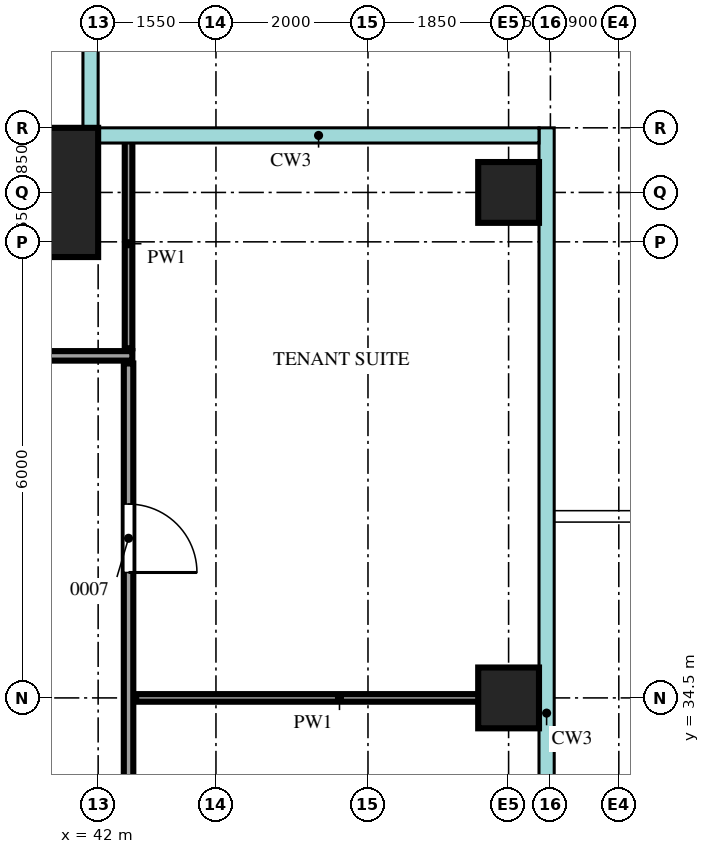
"""IFC4 building model, lengths in metres.
Left out: names, types, materials, properties, quantities, classifications, styles, units other than length and angle.
Written with IfcOpenShell. Run it as: python <this file> out.ifc"""

import sys

from ifc_helpers import new_model, si_unit, direction, frame, frame_2d, origin, origin_2d, place, context, subcontext, project, spatial, rectangle, extrude, source, transform, mapped, element, fill, save


model = new_model("IFC4")
c1 = context("Model", 3, precision=1e-05, world=origin(), true_north=direction((0.0, 1.0)))
c2 = subcontext(c1, "Body", "Model", "MODEL_VIEW")
j1 = project(units=[si_unit("LENGTHUNIT", "METRE"), si_unit("PLANEANGLEUNIT", "RADIAN")], contexts=[c1])
p1 = place(None, origin())
s1 = spatial("IfcSite", under=j1, at=p1, CompositionType="ELEMENT")
p2 = place(p1, origin())
s2 = spatial("IfcBuilding", under=s1, at=p2, CompositionType="ELEMENT")
p3 = place(p2, frame((0.0, 0.0, 286.2)))
s3 = spatial("IfcBuildingStorey", under=s2, at=p3, CompositionType="ELEMENT", Elevation=286.2)
m1 = source(origin(), c2, "Body", "SweptSolid", [
    extrude(rectangle(XDim=1.7, YDim=1.7, at=origin_2d()), origin(), (0.0, 0.0, 1.0), 3.75),
])
p4 = place(p3, frame((41.15, 41.15, 0.0), z_axis=(0.0, 0.0, 1.0), x_axis=(1.0, 0.0, 0.0)))
e1 = element("IfcColumn", 1, at=p4, inside=s3, PredefinedType="COLUMN", context=c2, shape_type="MappedRepresentation", body=[
    mapped(m1, transform((0.0, 0.0, 0.0))),
])
m2 = source(origin(), c2, "Body", "SweptSolid", [
    extrude(rectangle(XDim=0.8, YDim=0.8, at=origin_2d()), origin(), (0.0, 0.0, 1.0), 3.75),
])
for number, where, z_axis, x_axis in (
    (2, (47.4, 34.5, 0.0), (0.0, 0.0, 1.0), (1.0, 0.0, 0.0)),
    (3, (47.4, 41.15, 0.0), (0.0, 0.0, 1.0), (1.0, 0.0, 0.0)),
):
    element("IfcColumn", number, at=place(p3, frame(where, z_axis=z_axis, x_axis=x_axis)), inside=s3, PredefinedType="COLUMN", context=c2, shape_type="MappedRepresentation", body=[
        mapped(m2, transform((0.0, 0.0, 0.0))),
    ])
m3 = source(origin(), c2, "Body", "SweptSolid", [
    extrude(rectangle(XDim=23.8, YDim=0.125, at=frame_2d((11.9, 0.0))), origin(), (0.0, 0.0, 1.0), 3.8),
])
p5 = place(p3, frame((42.4, 15.1, 0.0), z_axis=(0.0, 0.0, 1.0), x_axis=(0.0, 1.0, 0.0)))
e4 = element("IfcWall", 4, at=p5, inside=s3, PredefinedType="PARTITIONING", context=c2, shape_type="MappedRepresentation", body=[
    mapped(m3, transform((0.0, 0.0, 0.0))),
])
m4 = source(origin(), c2, "Body", "SweptSolid", [
    extrude(rectangle(XDim=0.9, YDim=2.1, at=frame_2d((0.45, 1.05))), frame((0.0, 0.073, 0.0), z_axis=(0.0, -1.0, 0.0), x_axis=(1.0, 0.0, 0.0)), (0.0, 0.0, 1.0), 0.145),
])
p6 = place(p5, frame((5.3, 0.0, 0.0)))
e5 = element("IfcOpeningElement", 5, at=p6, cuts=e4, PredefinedType="OPENING", context=c2, shape_type="MappedRepresentation", body=[
    mapped(m4, transform((0.0, 0.0, 0.0))),
])
p7 = place(p5, frame((15.35, 0.0, 0.0)))
e6 = element("IfcOpeningElement", 6, at=p7, cuts=e4, PredefinedType="OPENING", context=c2, shape_type="MappedRepresentation", body=[
    mapped(m4, transform((0.0, 0.0, 0.0))),
])
p8 = place(p5, frame((21.05, 0.0, 0.0)))
e7 = element("IfcOpeningElement", 7, at=p8, cuts=e4, PredefinedType="OPENING", context=c2, shape_type="MappedRepresentation", body=[
    mapped(m4, transform((0.0, 0.0, 0.0))),
])
m5 = source(origin(), c2, "Body", "SweptSolid", [
    extrude(rectangle(XDim=5.35, YDim=0.1, at=frame_2d((2.675, 0.0))), origin(), (0.0, 0.0, 1.0), 3.8),
])
p9 = place(p3, frame((42.5, 34.5, 0.0), z_axis=(0.0, 0.0, 1.0), x_axis=(1.0, 0.0, 0.0)))
e8 = element("IfcWall", 8, at=p9, inside=s3, PredefinedType="PARTITIONING", context=c2, shape_type="MappedRepresentation", body=[
    mapped(m5, transform((0.0, 0.0, 0.0))),
])
m6 = source(origin(), c2, "Body", "SweptSolid", [
    extrude(rectangle(XDim=12.1, YDim=0.125, at=frame_2d((6.05, 0.0))), origin(), (0.0, 0.0, 1.0), 3.8),
])
p10 = place(p3, frame((30.35, 39.0, 0.0), z_axis=(0.0, 0.0, 1.0), x_axis=(1.0, 0.0, 0.0)))
e9 = element("IfcWall", 9, at=p10, inside=s3, PredefinedType="PARTITIONING", context=c2, shape_type="MappedRepresentation", body=[
    mapped(m6, transform((0.0, 0.0, 0.0))),
])
p11 = place(p10, frame((6.3, 0.0, 0.0)))
e10 = element("IfcOpeningElement", 10, at=p11, cuts=e9, PredefinedType="OPENING", context=c2, shape_type="MappedRepresentation", body=[
    mapped(m4, transform((0.0, 0.0, 0.0))),
])
m7 = source(origin(), c2, "Body", "SweptSolid", [
    extrude(rectangle(XDim=2.75, YDim=0.1, at=frame_2d((1.375, 0.0))), origin(), (0.0, 0.0, 1.0), 3.8),
])
p12 = place(p3, frame((42.4, 39.1, 0.0), z_axis=(0.0, 0.0, 1.0), x_axis=(0.0, 1.0, 0.0)))
e11 = element("IfcWall", 11, at=p12, inside=s3, PredefinedType="PARTITIONING", context=c2, shape_type="MappedRepresentation", body=[
    mapped(m7, transform((0.0, 0.0, 0.0))),
])
m8 = source(origin(), c2, "Body", "SweptSolid", [
    extrude(rectangle(XDim=0.9, YDim=2.1, at=frame_2d((0.45, 1.05))), frame((0.0, 0.025, 0.0), z_axis=(0.0, -1.0, 0.0), x_axis=(1.0, 0.0, 0.0)), (0.0, 0.0, 1.0), 0.05),
])
p13 = place(p8, origin())
e12 = element("IfcDoor", 12, at=p13, inside=s3, OperationType="SINGLE_SWING_LEFT", PredefinedType="DOOR", context=c2, shape_type="MappedRepresentation", body=[
    mapped(m8, transform((0.0, 0.0, 0.0))),
])
fill(e7, e12)
save(model, sys.argv[1])
